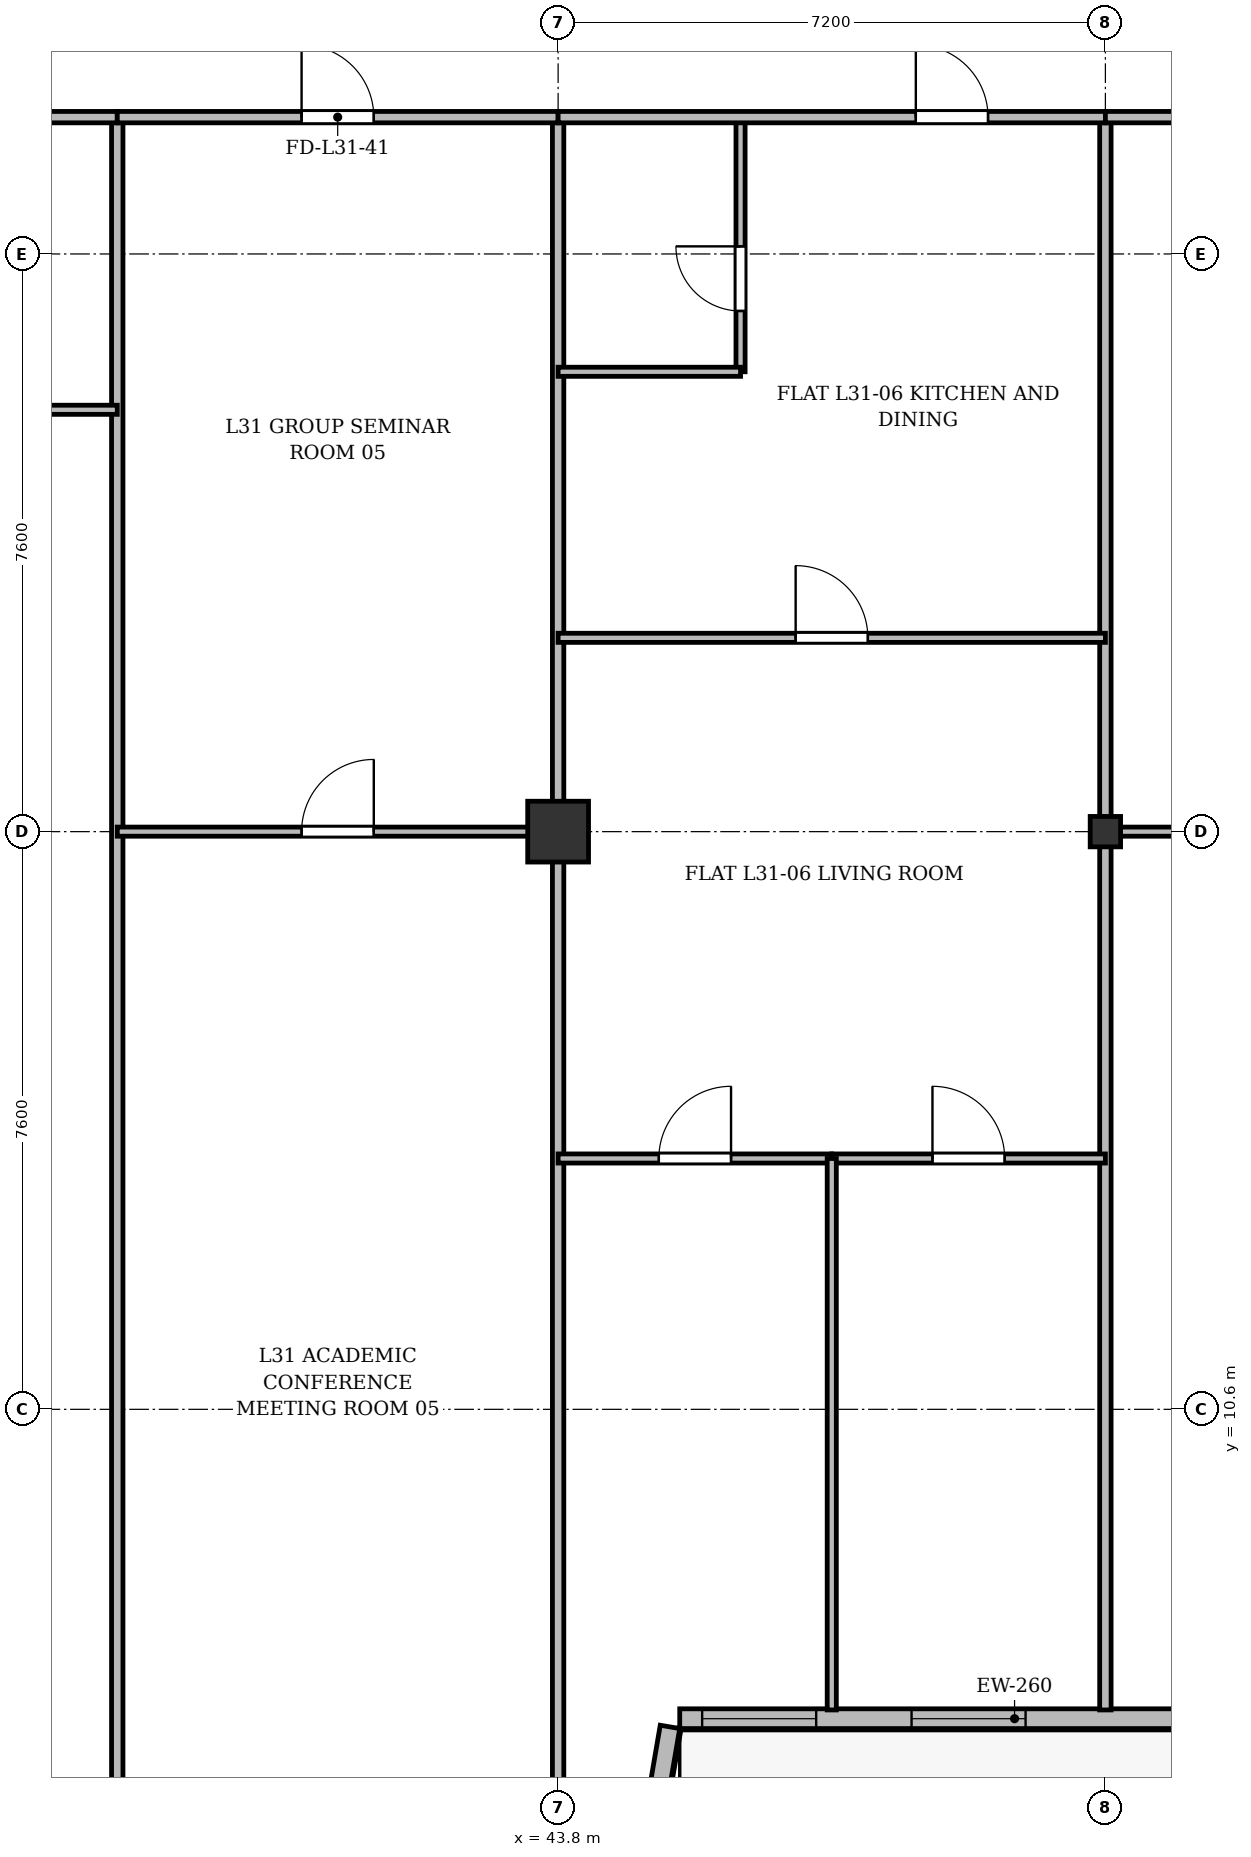
"""IFC4 building model, lengths in metres.
Left out: names, types, materials, properties, quantities, classifications, styles, units other than length and angle.
Written with IfcOpenShell. Run it as: python <this file> out.ifc"""

import sys

from ifc_helpers import new_model, si_unit, direction, frame, frame_2d, origin, origin_2d, place, context, subcontext, project, spatial, rectangle, i_section, extrude, source, transform, mapped, element, fill, save


model = new_model("IFC4")
c1 = context("Model", 3, precision=1e-05, world=origin(), true_north=direction((0.0, 1.0)))
c2 = subcontext(c1, "Body", "Model", "MODEL_VIEW")
j1 = project(units=[si_unit("LENGTHUNIT", "METRE"), si_unit("PLANEANGLEUNIT", "RADIAN")], contexts=[c1])
p1 = place(None, origin())
s1 = spatial("IfcSite", under=j1, at=p1, CompositionType="ELEMENT")
p2 = place(p1, origin())
s2 = spatial("IfcBuilding", under=s1, at=p2, CompositionType="ELEMENT")
p3 = place(p2, frame((0.0, 0.0, 121.3)))
s3 = spatial("IfcBuildingStorey", under=s2, at=p3, CompositionType="ELEMENT", Elevation=121.3)
m1 = source(origin(), c2, "Body", "SweptSolid", [
    extrude(rectangle(XDim=0.8, YDim=0.8, at=origin_2d()), origin(), (0.0, 0.0, 1.0), 3.6),
])
p4 = place(p3, frame((43.8, 18.2, 0.0), z_axis=(0.0, 0.0, 1.0), x_axis=(1.0, 0.0, 0.0)))
e1 = element("IfcColumn", 1, at=p4, inside=s3, PredefinedType="COLUMN", context=c2, shape_type="MappedRepresentation", body=[
    mapped(m1, transform((0.0, 0.0, 0.0), x_axis=(1.0, 0.0, 0.0), y_axis=(0.0, 1.0, 0.0), z_axis=(0.0, 0.0, 1.0), scale=1.0)),
])
m2 = source(origin(), c2, "Body", "SweptSolid", [
    extrude(i_section(OverallWidth=0.4, OverallDepth=0.4, WebThickness=0.022, FlangeThickness=0.035, at=origin_2d()), origin(), (0.0, 0.0, 1.0), 3.6),
])
p5 = place(p3, frame((51.0, 18.2, 0.0), z_axis=(0.0, 0.0, 1.0), x_axis=(1.0, 0.0, 0.0)))
e2 = element("IfcColumn", 2, at=p5, inside=s3, PredefinedType="COLUMN", context=c2, shape_type="MappedRepresentation", body=[
    mapped(m2, transform((0.0, 0.0, 0.0), x_axis=(1.0, 0.0, 0.0), y_axis=(0.0, 1.0, 0.0), z_axis=(0.0, 0.0, 1.0), scale=1.0)),
])
p6 = place(p3, frame((57.2, 6.53, 0.0), z_axis=(0.0, 0.0, 1.0), x_axis=(-1.0, 0.0, 0.0)))
e3 = element("IfcWall", 3, at=p6, inside=s3, PredefinedType="SOLIDWALL", context=c2, shape_type="SweptSolid", body=[
    extrude(rectangle(XDim=11.8, YDim=0.26, at=frame_2d((5.9, 0.0))), origin(), (0.0, 0.0, 1.0), 2.84),
])
p7 = place(p6, frame((1.49, 0.0, 0.0)))
e4 = element("IfcOpeningElement", 4, at=p7, cuts=e3, PredefinedType="OPENING", context=c2, shape_type="SweptSolid", body=[
    extrude(rectangle(XDim=1.2, YDim=2.2, at=frame_2d((0.6, 1.1))), frame((0.0, 0.14, 0.0), z_axis=(0.0, -1.0, 0.0), x_axis=(1.0, 0.0, 0.0)), (0.0, 0.0, 1.0), 0.28),
])
p8 = place(p6, frame((7.25, 0.0, 0.9)))
e5 = element("IfcOpeningElement", 5, at=p8, cuts=e3, PredefinedType="OPENING", context=c2, shape_type="SweptSolid", body=[
    extrude(rectangle(XDim=1.5, YDim=1.75, at=frame_2d((0.75, 0.875))), frame((0.0, 0.14, 0.0), z_axis=(0.0, -1.0, 0.0), x_axis=(1.0, 0.0, 0.0)), (0.0, 0.0, 1.0), 0.28),
])
p9 = place(p6, frame((10.005, 0.0, 0.9)))
e6 = element("IfcOpeningElement", 6, at=p9, cuts=e3, PredefinedType="OPENING", context=c2, shape_type="SweptSolid", body=[
    extrude(rectangle(XDim=1.5, YDim=1.75, at=frame_2d((0.75, 0.875))), frame((0.0, 0.14, 0.0), z_axis=(0.0, -1.0, 0.0), x_axis=(1.0, 0.0, 0.0)), (0.0, 0.0, 1.0), 0.28),
])
p10 = place(p3, frame((45.272, 6.422, 0.0), z_axis=(0.0, 0.0, 1.0), x_axis=(-0.168990530437, -0.98561767467, 0.0)))
e7 = element("IfcWall", 7, at=p10, inside=s3, PredefinedType="SOLIDWALL", context=c2, shape_type="SweptSolid", body=[
    extrude(rectangle(XDim=3.551, YDim=0.26, at=frame_2d((1.775, 0.0))), origin(), (0.0, 0.0, 1.0), 2.752),
])
p11 = place(p3, frame((38.0, 3.145, 0.0), z_axis=(0.0, 0.0, 1.0), x_axis=(0.0, 1.0, 0.0)))
e8 = element("IfcWall", 8, at=p11, inside=s3, PredefinedType="PARTITIONING", context=c2, shape_type="SweptSolid", body=[
    extrude(rectangle(XDim=24.455, YDim=0.15, at=frame_2d((12.228, 0.0))), origin(), (0.0, 0.0, 1.0), 2.752),
])
p12 = place(p3, frame((43.8, 3.145, 0.0), z_axis=(0.0, 0.0, 1.0), x_axis=(0.0, 1.0, 0.0)))
e9 = element("IfcWall", 9, at=p12, inside=s3, PredefinedType="PARTITIONING", context=c2, shape_type="SweptSolid", body=[
    extrude(rectangle(XDim=24.455, YDim=0.15, at=frame_2d((12.228, 0.0))), origin(), (0.0, 0.0, 1.0), 2.84),
])
p13 = place(p3, frame((51.0, 6.645, 0.0), z_axis=(0.0, 0.0, 1.0), x_axis=(0.0, 1.0, 0.0)))
e10 = element("IfcWall", 10, at=p13, inside=s3, PredefinedType="PARTITIONING", context=c2, shape_type="SweptSolid", body=[
    extrude(rectangle(XDim=20.955, YDim=0.15, at=frame_2d((10.478, 0.0))), origin(), (0.0, 0.0, 1.0), 2.84),
])
p14 = place(p3, frame((30.6, 27.6, 0.0), z_axis=(0.0, 0.0, 1.0), x_axis=(1.0, 0.0, 0.0)))
e11 = element("IfcWall", 11, at=p14, inside=s3, PredefinedType="PARTITIONING", context=c2, shape_type="SweptSolid", body=[
    extrude(rectangle(XDim=7.4, YDim=0.15, at=frame_2d((3.7, 0.0))), origin(), (0.0, 0.0, 1.0), 2.84),
])
p15 = place(p14, frame((3.133, 0.0, 0.0)))
e12 = element("IfcOpeningElement", 12, at=p15, cuts=e11, PredefinedType="OPENING", context=c2, shape_type="SweptSolid", body=[
    extrude(rectangle(XDim=0.95, YDim=2.15, at=frame_2d((0.475, 1.075))), frame((0.0, 0.085, 0.0), z_axis=(0.0, -1.0, 0.0), x_axis=(1.0, 0.0, 0.0)), (0.0, 0.0, 1.0), 0.17),
])
p16 = place(p3, frame((30.6, 23.75, 0.0), z_axis=(0.0, 0.0, 1.0), x_axis=(1.0, 0.0, 0.0)))
e13 = element("IfcWall", 13, at=p16, inside=s3, PredefinedType="PARTITIONING", context=c2, shape_type="SweptSolid", body=[
    extrude(rectangle(XDim=7.4, YDim=0.12, at=frame_2d((3.7, 0.0))), origin(), (0.0, 0.0, 1.0), 2.84),
])
p17 = place(p16, frame((3.133, 0.0, 0.0)))
e14 = element("IfcOpeningElement", 14, at=p17, cuts=e13, PredefinedType="OPENING", context=c2, shape_type="SweptSolid", body=[
    extrude(rectangle(XDim=0.95, YDim=2.15, at=frame_2d((0.475, 1.075))), frame((0.0, 0.07, 0.0), z_axis=(0.0, -1.0, 0.0), x_axis=(1.0, 0.0, 0.0)), (0.0, 0.0, 1.0), 0.14),
])
p18 = place(p3, frame((38.0, 27.6, 0.0), z_axis=(0.0, 0.0, 1.0), x_axis=(1.0, 0.0, 0.0)))
e15 = element("IfcWall", 15, at=p18, inside=s3, PredefinedType="PARTITIONING", context=c2, shape_type="SweptSolid", body=[
    extrude(rectangle(XDim=5.8, YDim=0.15, at=frame_2d((2.9, 0.0))), origin(), (0.0, 0.0, 1.0), 2.84),
])
p19 = place(p18, frame((2.425, 0.0, 0.0)))
e16 = element("IfcOpeningElement", 16, at=p19, cuts=e15, PredefinedType="OPENING", context=c2, shape_type="SweptSolid", body=[
    extrude(rectangle(XDim=0.95, YDim=2.15, at=frame_2d((0.475, 1.075))), frame((0.0, 0.085, 0.0), z_axis=(0.0, -1.0, 0.0), x_axis=(1.0, 0.0, 0.0)), (0.0, 0.0, 1.0), 0.17),
])
p20 = place(p3, frame((38.0, 18.2, 0.0), z_axis=(0.0, 0.0, 1.0), x_axis=(1.0, 0.0, 0.0)))
e17 = element("IfcWall", 17, at=p20, inside=s3, PredefinedType="PARTITIONING", context=c2, shape_type="SweptSolid", body=[
    extrude(rectangle(XDim=5.8, YDim=0.12, at=frame_2d((2.9, 0.0))), origin(), (0.0, 0.0, 1.0), 2.752),
])
p21 = place(p20, frame((2.425, 0.0, 0.0)))
e18 = element("IfcOpeningElement", 18, at=p21, cuts=e17, PredefinedType="OPENING", context=c2, shape_type="SweptSolid", body=[
    extrude(rectangle(XDim=0.95, YDim=2.15, at=frame_2d((0.475, 1.075))), frame((0.0, 0.07, 0.0), z_axis=(0.0, -1.0, 0.0), x_axis=(1.0, 0.0, 0.0)), (0.0, 0.0, 1.0), 0.14),
])
p22 = place(p3, frame((43.8, 20.75, 0.0), z_axis=(0.0, 0.0, 1.0), x_axis=(1.0, 0.0, 0.0)))
e19 = element("IfcWall", 19, at=p22, inside=s3, PredefinedType="PARTITIONING", context=c2, shape_type="SweptSolid", body=[
    extrude(rectangle(XDim=7.2, YDim=0.12, at=frame_2d((3.6, 0.0))), origin(), (0.0, 0.0, 1.0), 2.84),
])
p23 = place(p22, frame((3.125, 0.0, 0.0)))
e20 = element("IfcOpeningElement", 20, at=p23, cuts=e19, PredefinedType="OPENING", context=c2, shape_type="SweptSolid", body=[
    extrude(rectangle(XDim=0.95, YDim=2.15, at=frame_2d((0.475, 1.075))), frame((0.0, 0.07, 0.0), z_axis=(0.0, -1.0, 0.0), x_axis=(1.0, 0.0, 0.0)), (0.0, 0.0, 1.0), 0.14),
])
p24 = place(p3, frame((46.2, 24.25, 0.0), z_axis=(0.0, 0.0, 1.0), x_axis=(0.0, 1.0, 0.0)))
e21 = element("IfcWall", 21, at=p24, inside=s3, PredefinedType="PARTITIONING", context=c2, shape_type="SweptSolid", body=[
    extrude(rectangle(XDim=3.35, YDim=0.12, at=frame_2d((1.675, 0.0))), origin(), (0.0, 0.0, 1.0), 2.99),
])
p25 = place(p24, frame((0.8, 0.0, 0.0)))
e22 = element("IfcOpeningElement", 22, at=p25, cuts=e21, PredefinedType="OPENING", context=c2, shape_type="SweptSolid", body=[
    extrude(rectangle(XDim=0.85, YDim=2.1, at=frame_2d((0.425, 1.05))), frame((0.0, 0.07, 0.0), z_axis=(0.0, -1.0, 0.0), x_axis=(1.0, 0.0, 0.0)), (0.0, 0.0, 1.0), 0.14),
])
p26 = place(p3, frame((43.8, 24.25, 0.0), z_axis=(0.0, 0.0, 1.0), x_axis=(1.0, 0.0, 0.0)))
e23 = element("IfcWall", 23, at=p26, inside=s3, PredefinedType="PARTITIONING", context=c2, shape_type="SweptSolid", body=[
    extrude(rectangle(XDim=2.4, YDim=0.12, at=frame_2d((1.2, 0.0))), origin(), (0.0, 0.0, 1.0), 2.84),
])
p27 = place(p3, frame((43.8, 27.6, 0.0), z_axis=(0.0, 0.0, 1.0), x_axis=(1.0, 0.0, 0.0)))
e24 = element("IfcWall", 24, at=p27, inside=s3, PredefinedType="PARTITIONING", context=c2, shape_type="SweptSolid", body=[
    extrude(rectangle(XDim=7.2, YDim=0.15, at=frame_2d((3.6, 0.0))), origin(), (0.0, 0.0, 1.0), 2.84),
])
p28 = place(p27, frame((4.706, 0.0, 0.0)))
e25 = element("IfcOpeningElement", 25, at=p28, cuts=e24, PredefinedType="OPENING", context=c2, shape_type="SweptSolid", body=[
    extrude(rectangle(XDim=0.95, YDim=2.15, at=frame_2d((0.475, 1.075))), frame((0.0, 0.085, 0.0), z_axis=(0.0, -1.0, 0.0), x_axis=(1.0, 0.0, 0.0)), (0.0, 0.0, 1.0), 0.17),
])
p29 = place(p3, frame((43.8, 13.9, 0.0), z_axis=(0.0, 0.0, 1.0), x_axis=(1.0, 0.0, 0.0)))
e26 = element("IfcWall", 26, at=p29, inside=s3, PredefinedType="PARTITIONING", context=c2, shape_type="SweptSolid", body=[
    extrude(rectangle(XDim=3.6, YDim=0.12, at=frame_2d((1.8, 0.0))), origin(), (0.0, 0.0, 1.0), 2.84),
])
p30 = place(p29, frame((1.325, 0.0, 0.0)))
e27 = element("IfcOpeningElement", 27, at=p30, cuts=e26, PredefinedType="OPENING", context=c2, shape_type="SweptSolid", body=[
    extrude(rectangle(XDim=0.95, YDim=2.15, at=frame_2d((0.475, 1.075))), frame((0.0, 0.07, 0.0), z_axis=(0.0, -1.0, 0.0), x_axis=(1.0, 0.0, 0.0)), (0.0, 0.0, 1.0), 0.14),
])
p31 = place(p3, frame((47.4, 13.9, 0.0), z_axis=(0.0, 0.0, 1.0), x_axis=(1.0, 0.0, 0.0)))
e28 = element("IfcWall", 28, at=p31, inside=s3, PredefinedType="PARTITIONING", context=c2, shape_type="SweptSolid", body=[
    extrude(rectangle(XDim=3.6, YDim=0.12, at=frame_2d((1.8, 0.0))), origin(), (0.0, 0.0, 1.0), 2.84),
])
p32 = place(p31, frame((1.325, 0.0, 0.0)))
e29 = element("IfcOpeningElement", 29, at=p32, cuts=e28, PredefinedType="OPENING", context=c2, shape_type="SweptSolid", body=[
    extrude(rectangle(XDim=0.95, YDim=2.15, at=frame_2d((0.475, 1.075))), frame((0.0, 0.07, 0.0), z_axis=(0.0, -1.0, 0.0), x_axis=(1.0, 0.0, 0.0)), (0.0, 0.0, 1.0), 0.14),
])
p33 = place(p3, frame((47.4, 6.645, 0.0), z_axis=(0.0, 0.0, 1.0), x_axis=(0.0, 1.0, 0.0)))
e30 = element("IfcWall", 30, at=p33, inside=s3, PredefinedType="PARTITIONING", context=c2, shape_type="SweptSolid", body=[
    extrude(rectangle(XDim=7.255, YDim=0.12, at=frame_2d((3.627, 0.0))), origin(), (0.0, 0.0, 1.0), 3.34),
])
p34 = place(p3, frame((51.0, 27.6, 0.0), z_axis=(0.0, 0.0, 1.0), x_axis=(1.0, 0.0, 0.0)))
e31 = element("IfcWall", 31, at=p34, inside=s3, PredefinedType="PARTITIONING", context=c2, shape_type="SweptSolid", body=[
    extrude(rectangle(XDim=7.8, YDim=0.15, at=frame_2d((3.9, 0.0))), origin(), (0.0, 0.0, 1.0), 2.84),
])
p35 = place(p34, frame((3.333, 0.0, 0.0)))
e32 = element("IfcOpeningElement", 32, at=p35, cuts=e31, PredefinedType="OPENING", context=c2, shape_type="SweptSolid", body=[
    extrude(rectangle(XDim=0.95, YDim=2.15, at=frame_2d((0.475, 1.075))), frame((0.0, 0.085, 0.0), z_axis=(0.0, -1.0, 0.0), x_axis=(1.0, 0.0, 0.0)), (0.0, 0.0, 1.0), 0.17),
])
p36 = place(p3, frame((51.0, 18.2, 0.0), z_axis=(0.0, 0.0, 1.0), x_axis=(1.0, 0.0, 0.0)))
e33 = element("IfcWall", 33, at=p36, inside=s3, PredefinedType="PARTITIONING", context=c2, shape_type="SweptSolid", body=[
    extrude(rectangle(XDim=7.8, YDim=0.12, at=frame_2d((3.9, 0.0))), origin(), (0.0, 0.0, 1.0), 2.752),
])
p37 = place(p36, frame((3.333, 0.0, 0.0)))
e34 = element("IfcOpeningElement", 34, at=p37, cuts=e33, PredefinedType="OPENING", context=c2, shape_type="SweptSolid", body=[
    extrude(rectangle(XDim=0.95, YDim=2.15, at=frame_2d((0.475, 1.075))), frame((0.0, 0.07, 0.0), z_axis=(0.0, -1.0, 0.0), x_axis=(1.0, 0.0, 0.0)), (0.0, 0.0, 1.0), 0.14),
])
m3 = source(origin(), c2, "Body", "SweptSolid", [
    extrude(rectangle(XDim=1.5, YDim=1.75, at=frame_2d((0.75, 0.875))), frame((0.0, 0.03, 0.0), z_axis=(0.0, -1.0, 0.0), x_axis=(1.0, 0.0, 0.0)), (0.0, 0.0, 1.0), 0.06),
])
p38 = place(p8, origin())
e35 = element("IfcWindow", 35, at=p38, inside=s3, PartitioningType="SINGLE_PANEL", PredefinedType="WINDOW", context=c2, shape_type="MappedRepresentation", body=[
    mapped(m3, transform((0.0, 0.0, 0.0), x_axis=(1.0, 0.0, 0.0), y_axis=(0.0, 1.0, 0.0), z_axis=(0.0, 0.0, 1.0), scale=1.0)),
])
fill(e5, e35)
p39 = place(p9, origin())
e36 = element("IfcWindow", 36, at=p39, inside=s3, PartitioningType="SINGLE_PANEL", PredefinedType="WINDOW", context=c2, shape_type="MappedRepresentation", body=[
    mapped(m3, transform((0.0, 0.0, 0.0), x_axis=(1.0, 0.0, 0.0), y_axis=(0.0, 1.0, 0.0), z_axis=(0.0, 0.0, 1.0), scale=1.0)),
])
fill(e6, e36)
m4 = source(origin(), c2, "Body", "SweptSolid", [
    extrude(rectangle(XDim=0.95, YDim=2.15, at=frame_2d((0.475, 1.075))), frame((0.0, 0.025, 0.0), z_axis=(0.0, -1.0, 0.0), x_axis=(1.0, 0.0, 0.0)), (0.0, 0.0, 1.0), 0.05),
])
p40 = place(p19, origin())
e37 = element("IfcDoor", 37, at=p40, inside=s3, OperationType="SINGLE_SWING_LEFT", PredefinedType="DOOR", context=c2, shape_type="MappedRepresentation", body=[
    mapped(m4, transform((0.0, 0.0, 0.0), x_axis=(1.0, 0.0, 0.0), y_axis=(0.0, 1.0, 0.0), z_axis=(0.0, 0.0, 1.0), scale=1.0)),
])
fill(e16, e37)
p41 = place(p21, origin())
e38 = element("IfcDoor", 38, at=p41, inside=s3, OperationType="SINGLE_SWING_RIGHT", PredefinedType="DOOR", context=c2, shape_type="MappedRepresentation", body=[
    mapped(m4, transform((0.0, 0.0, 0.0), x_axis=(1.0, 0.0, 0.0), y_axis=(0.0, 1.0, 0.0), z_axis=(0.0, 0.0, 1.0), scale=1.0)),
])
fill(e18, e38)
p42 = place(p23, origin())
e39 = element("IfcDoor", 39, at=p42, inside=s3, OperationType="SINGLE_SWING_LEFT", PredefinedType="DOOR", context=c2, shape_type="MappedRepresentation", body=[
    mapped(m4, transform((0.0, 0.0, 0.0), x_axis=(1.0, 0.0, 0.0), y_axis=(0.0, 1.0, 0.0), z_axis=(0.0, 0.0, 1.0), scale=1.0)),
])
fill(e20, e39)
m5 = source(origin(), c2, "Body", "SweptSolid", [
    extrude(rectangle(XDim=0.85, YDim=2.1, at=frame_2d((0.425, 1.05))), frame((0.0, 0.025, 0.0), z_axis=(0.0, -1.0, 0.0), x_axis=(1.0, 0.0, 0.0)), (0.0, 0.0, 1.0), 0.05),
])
p43 = place(p25, origin())
e40 = element("IfcDoor", 40, at=p43, inside=s3, OperationType="SINGLE_SWING_RIGHT", PredefinedType="DOOR", context=c2, shape_type="MappedRepresentation", body=[
    mapped(m5, transform((0.0, 0.0, 0.0), x_axis=(1.0, 0.0, 0.0), y_axis=(0.0, 1.0, 0.0), z_axis=(0.0, 0.0, 1.0), scale=1.0)),
])
fill(e22, e40)
p44 = place(p28, origin())
e41 = element("IfcDoor", 41, at=p44, inside=s3, OperationType="SINGLE_SWING_LEFT", PredefinedType="DOOR", context=c2, shape_type="MappedRepresentation", body=[
    mapped(m4, transform((0.0, 0.0, 0.0), x_axis=(1.0, 0.0, 0.0), y_axis=(0.0, 1.0, 0.0), z_axis=(0.0, 0.0, 1.0), scale=1.0)),
])
fill(e25, e41)
p45 = place(p30, origin())
e42 = element("IfcDoor", 42, at=p45, inside=s3, OperationType="SINGLE_SWING_RIGHT", PredefinedType="DOOR", context=c2, shape_type="MappedRepresentation", body=[
    mapped(m4, transform((0.0, 0.0, 0.0), x_axis=(1.0, 0.0, 0.0), y_axis=(0.0, 1.0, 0.0), z_axis=(0.0, 0.0, 1.0), scale=1.0)),
])
fill(e27, e42)
p46 = place(p32, origin())
e43 = element("IfcDoor", 43, at=p46, inside=s3, OperationType="SINGLE_SWING_LEFT", PredefinedType="DOOR", context=c2, shape_type="MappedRepresentation", body=[
    mapped(m4, transform((0.0, 0.0, 0.0), x_axis=(1.0, 0.0, 0.0), y_axis=(0.0, 1.0, 0.0), z_axis=(0.0, 0.0, 1.0), scale=1.0)),
])
fill(e29, e43)
save(model, sys.argv[1])
